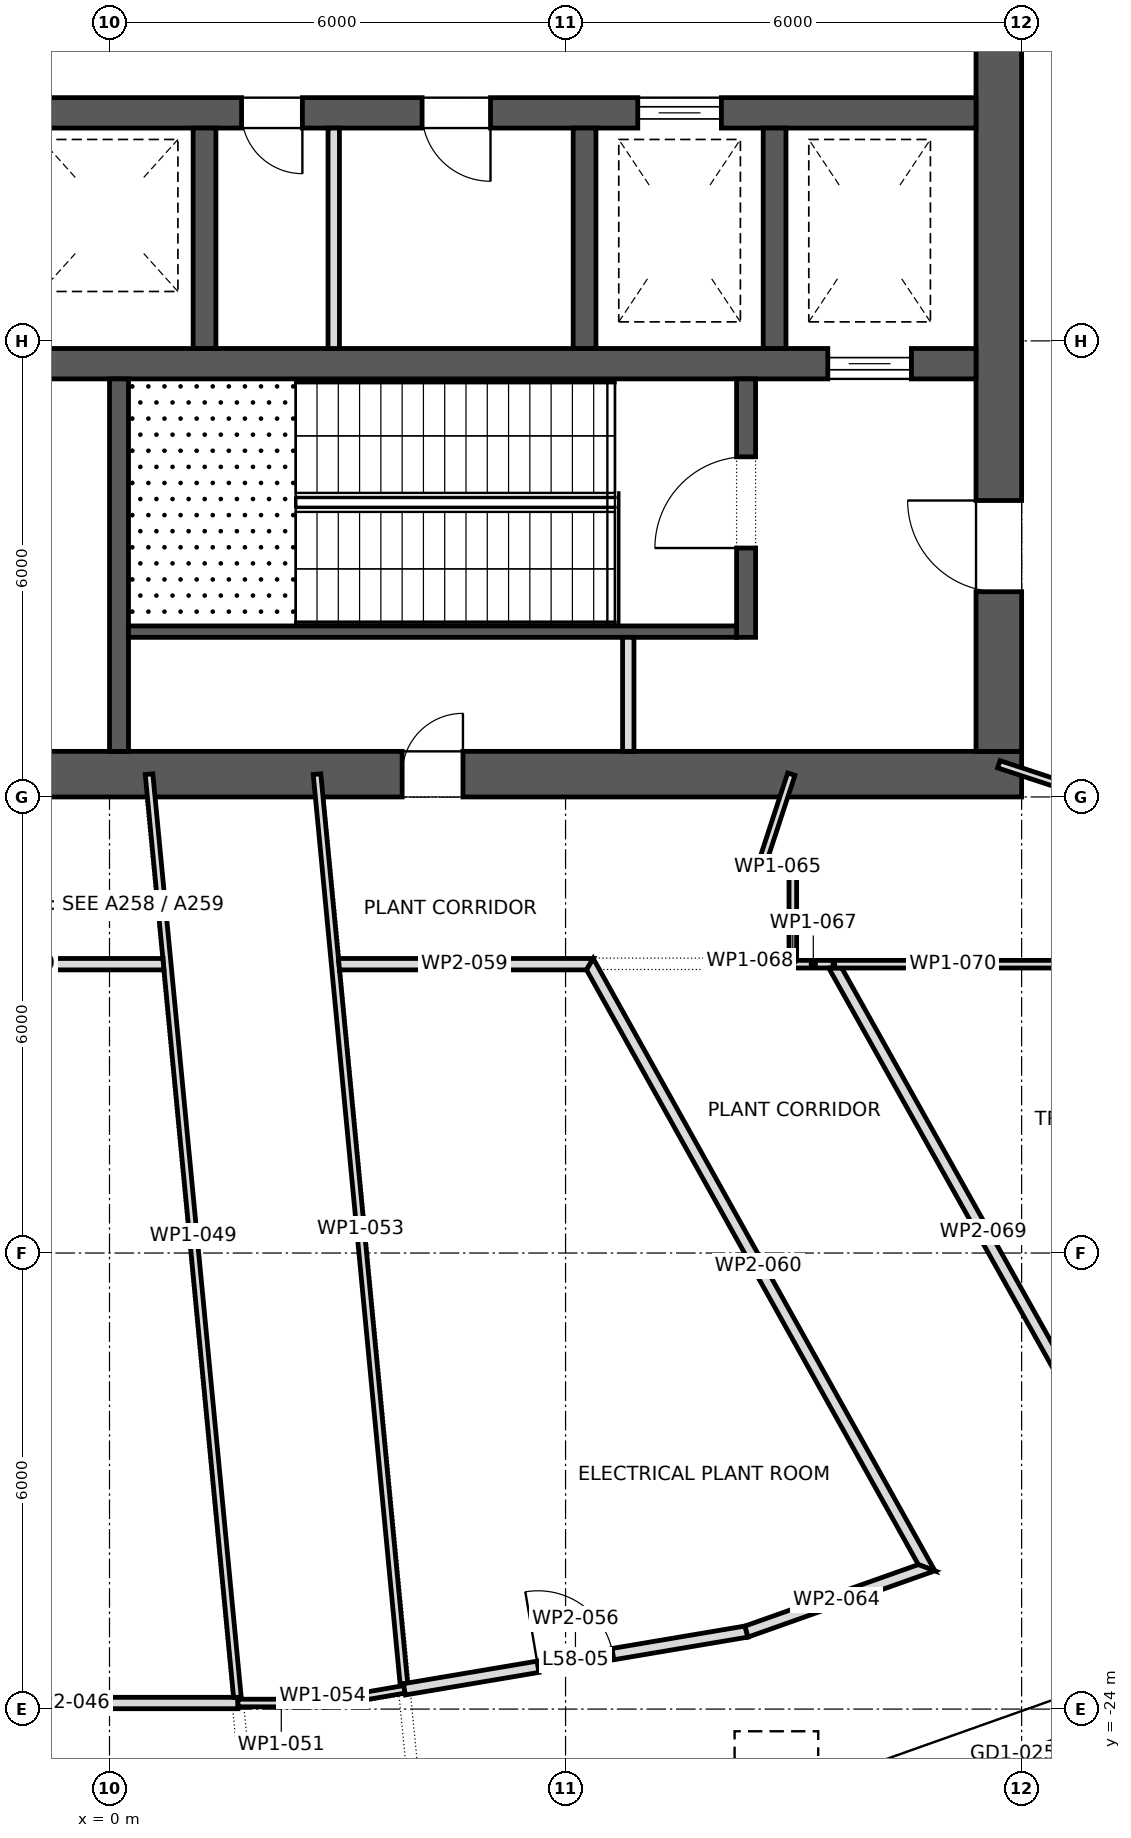
"""IFC4 building model, lengths in metres.
Left out: names, types, materials, properties, quantities, classifications, styles, units other than length and angle.
Written with IfcOpenShell. Run it as: python <this file> out.ifc"""

import sys

from ifc_helpers import new_model, si_unit, direction, frame, frame_2d, origin, origin_2d, place, context, subcontext, project, spatial, polyline, rectangle, outline, extrude, element, fill, save


model = new_model("IFC4")
c1 = context("Model", 3, precision=1e-05, world=origin(), true_north=direction((0.0, 1.0)))
c2 = subcontext(c1, "Body", "Model", "MODEL_VIEW")
j1 = project(units=[si_unit("LENGTHUNIT", "METRE"), si_unit("PLANEANGLEUNIT", "RADIAN")], contexts=[c1])
p1 = place(None, origin())
s1 = spatial("IfcSite", under=j1, at=p1, CompositionType="ELEMENT")
p2 = place(p1, origin())
s2 = spatial("IfcBuilding", under=s1, at=p2, CompositionType="ELEMENT")
p3 = place(p2, frame((0.0, 0.0, 250.9)))
s3 = spatial("IfcBuildingStorey", under=s2, at=p3, CompositionType="ELEMENT", Elevation=250.9)
p4 = place(p3, frame((9.056, -25.588, 0.079), z_axis=(-0.053067495482, 0.149959361151, 0.987266950184), x_axis=(-0.942712482292, -0.333606318481, 0.0)))
e1 = element("IfcColumn", 1, at=p4, inside=s3, PredefinedType="COLUMN", context=c2, shape_type="SweptSolid", body=[
    extrude(rectangle(XDim=1.1, YDim=1.0, at=origin_2d()), origin(), (0.0, 0.0, 1.0), 5.309),
])
p5 = place(p3, frame((-12.0, -11.7, 0.0), z_axis=(0.0, 0.0, 1.0), x_axis=(1.0, 0.0, 0.0)))
e2 = element("IfcWall", 2, at=p5, inside=s3, PredefinedType="SHEAR", context=c2, shape_type="SweptSolid", body=[
    extrude(rectangle(XDim=24.0, YDim=0.6, at=frame_2d((12.0, 0.0))), origin(), (0.0, 0.0, 1.0), 5.4),
])
p6 = place(p5, frame((10.025, 0.0, 0.0)))
e3 = element("IfcOpeningElement", 3, at=p6, cuts=e2, PredefinedType="OPENING", context=c2, shape_type="SweptSolid", body=[
    extrude(rectangle(XDim=0.8, YDim=2.1, at=frame_2d((0.4, 1.05))), frame((0.0, 0.312, 0.0), z_axis=(0.0, -1.0, 0.0), x_axis=(1.0, 0.0, 0.0)), (0.0, 0.0, 1.0), 0.624),
])
p7 = place(p5, frame((4.2, 0.0, 0.0)))
e4 = element("IfcOpeningElement", 4, at=p7, cuts=e2, PredefinedType="OPENING", context=c2, shape_type="SweptSolid", body=[
    extrude(rectangle(XDim=0.8, YDim=2.1, at=frame_2d((0.4, 1.05))), frame((0.0, 0.312, 0.0), z_axis=(0.0, -1.0, 0.0), x_axis=(1.0, 0.0, 0.0)), (0.0, 0.0, 1.0), 0.624),
])
p8 = place(p5, frame((15.85, 0.0, 0.0)))
e5 = element("IfcOpeningElement", 5, at=p8, cuts=e2, PredefinedType="OPENING", context=c2, shape_type="SweptSolid", body=[
    extrude(rectangle(XDim=0.8, YDim=2.1, at=frame_2d((0.4, 1.05))), frame((0.0, 0.312, 0.0), z_axis=(0.0, -1.0, 0.0), x_axis=(1.0, 0.0, 0.0)), (0.0, 0.0, 1.0), 0.624),
])
p9 = place(p3, frame((11.7, -11.4, 0.0), z_axis=(0.0, 0.0, 1.0), x_axis=(0.0, 1.0, 0.0)))
e6 = element("IfcWall", 6, at=p9, inside=s3, PredefinedType="SHEAR", context=c2, shape_type="SweptSolid", body=[
    extrude(rectangle(XDim=22.8, YDim=0.6, at=frame_2d((11.4, 0.0))), origin(), (0.0, 0.0, 1.0), 5.4),
])
p10 = place(p9, frame((10.2, 0.0, 0.0)))
e7 = element("IfcOpeningElement", 7, at=p10, cuts=e6, PredefinedType="OPENING", context=c2, shape_type="SweptSolid", body=[
    extrude(rectangle(XDim=2.4, YDim=2.1, at=frame_2d((1.2, 1.05))), frame((0.0, 0.312, 0.0), z_axis=(0.0, -1.0, 0.0), x_axis=(1.0, 0.0, 0.0)), (0.0, 0.0, 1.0), 0.624),
])
p11 = place(p9, frame((19.5, 0.0, 0.0)))
e8 = element("IfcOpeningElement", 8, at=p11, cuts=e6, PredefinedType="OPENING", context=c2, shape_type="SweptSolid", body=[
    extrude(rectangle(XDim=1.2, YDim=2.1, at=frame_2d((0.6, 1.05))), frame((0.0, 0.312, 0.0), z_axis=(0.0, -1.0, 0.0), x_axis=(1.0, 0.0, 0.0)), (0.0, 0.0, 1.0), 0.624),
])
p12 = place(p9, frame((2.1, 0.0, 0.0)))
e9 = element("IfcOpeningElement", 9, at=p12, cuts=e6, PredefinedType="OPENING", context=c2, shape_type="SweptSolid", body=[
    extrude(rectangle(XDim=1.2, YDim=2.1, at=frame_2d((0.6, 1.05))), frame((0.0, 0.312, 0.0), z_axis=(0.0, -1.0, 0.0), x_axis=(1.0, 0.0, 0.0)), (0.0, 0.0, 1.0), 0.624),
])
p13 = place(p3, frame((-11.4, -3.0, 0.0), z_axis=(0.0, 0.0, 1.0), x_axis=(1.0, 0.0, 0.0)))
e10 = element("IfcWall", 10, at=p13, inside=s3, PredefinedType="SHEAR", context=c2, shape_type="SweptSolid", body=[
    extrude(rectangle(XDim=22.8, YDim=0.4, at=frame_2d((11.4, 0.0))), origin(), (0.0, 0.0, 1.0), 5.4),
])
p14 = place(p13, frame((18.35, 0.0, 0.0)))
e11 = element("IfcOpeningElement", 11, at=p14, cuts=e10, PredefinedType="OPENING", context=c2, shape_type="SweptSolid", body=[
    extrude(rectangle(XDim=1.1, YDim=2.1, at=frame_2d((0.55, 1.05))), frame((0.0, 0.212, 0.0), z_axis=(0.0, -1.0, 0.0), x_axis=(1.0, 0.0, 0.0)), (0.0, 0.0, 1.0), 0.424),
])
p15 = place(p13, frame((13.137, 0.0, 0.0)))
e12 = element("IfcOpeningElement", 12, at=p15, cuts=e10, PredefinedType="OPENING", context=c2, shape_type="SweptSolid", body=[
    extrude(rectangle(XDim=0.8, YDim=2.1, at=frame_2d((0.4, 1.05))), frame((0.0, 0.212, 0.0), z_axis=(0.0, -1.0, 0.0), x_axis=(1.0, 0.0, 0.0)), (0.0, 0.0, 1.0), 0.424),
])
p16 = place(p13, frame((15.512, 0.0, 0.0)))
e13 = element("IfcOpeningElement", 13, at=p16, cuts=e10, PredefinedType="OPENING", context=c2, shape_type="SweptSolid", body=[
    extrude(rectangle(XDim=0.9, YDim=2.1, at=frame_2d((0.45, 1.05))), frame((0.0, 0.212, 0.0), z_axis=(0.0, -1.0, 0.0), x_axis=(1.0, 0.0, 0.0)), (0.0, 0.0, 1.0), 0.424),
])
p17 = place(p3, frame((-11.4, -6.3, 0.0), z_axis=(0.0, 0.0, 1.0), x_axis=(1.0, 0.0, 0.0)))
e14 = element("IfcWall", 14, at=p17, inside=s3, PredefinedType="SHEAR", context=c2, shape_type="SweptSolid", body=[
    extrude(rectangle(XDim=22.8, YDim=0.4, at=frame_2d((11.4, 0.0))), origin(), (0.0, 0.0, 1.0), 5.4),
])
p18 = place(p17, frame((20.85, 0.0, 0.0)))
e15 = element("IfcOpeningElement", 15, at=p18, cuts=e14, PredefinedType="OPENING", context=c2, shape_type="SweptSolid", body=[
    extrude(rectangle(XDim=1.1, YDim=2.1, at=frame_2d((0.55, 1.05))), frame((0.0, 0.212, 0.0), z_axis=(0.0, -1.0, 0.0), x_axis=(1.0, 0.0, 0.0)), (0.0, 0.0, 1.0), 0.424),
])
for number, where, z_axis, x_axis in (
    (16, (1.25, -6.1, 0.0), (0.0, 0.0, 1.0), (0.0, 1.0, 0.0)),
    (17, (6.25, -6.1, 0.0), (0.0, 0.0, 1.0), (0.0, 1.0, 0.0)),
    (18, (8.75, -6.1, 0.0), (0.0, 0.0, 1.0), (0.0, 1.0, 0.0)),
):
    element("IfcWall", number, at=place(p3, frame(where, z_axis=z_axis, x_axis=x_axis)), inside=s3, PredefinedType="SHEAR", context=c2, shape_type="SweptSolid", body=[
        extrude(rectangle(XDim=2.9, YDim=0.3, at=frame_2d((1.45, 0.0))), origin(), (0.0, 0.0, 1.0), 5.4),
    ])
p19 = place(p3, frame((0.125, -11.4, 0.0), z_axis=(0.0, 0.0, 1.0), x_axis=(0.0, 1.0, 0.0)))
e19 = element("IfcWall", 19, at=p19, inside=s3, PredefinedType="SHEAR", context=c2, shape_type="SweptSolid", body=[
    extrude(rectangle(XDim=4.9, YDim=0.25, at=frame_2d((2.45, 0.0))), origin(), (0.0, 0.0, 1.0), 5.1),
])
p20 = place(p3, frame((8.375, -9.9, 0.0), z_axis=(0.0, 0.0, 1.0), x_axis=(0.0, 1.0, 0.0)))
e20 = element("IfcWall", 20, at=p20, inside=s3, PredefinedType="SHEAR", context=c2, shape_type="SweptSolid", body=[
    extrude(rectangle(XDim=3.4, YDim=0.25, at=frame_2d((1.7, 0.0))), origin(), (0.0, 0.0, 1.0), 5.1),
])
p21 = place(p20, frame((1.175, 0.0, 0.0)))
e21 = element("IfcOpeningElement", 21, at=p21, cuts=e20, PredefinedType="OPENING", context=c2, shape_type="SweptSolid", body=[
    extrude(rectangle(XDim=1.2, YDim=2.1, at=frame_2d((0.6, 1.05))), frame((0.0, 0.137, 0.0), z_axis=(0.0, -1.0, 0.0), x_axis=(1.0, 0.0, 0.0)), (0.0, 0.0, 1.0), 0.274),
])
p22 = place(p3, frame((0.25, -9.825, 0.0), z_axis=(0.0, 0.0, 1.0), x_axis=(1.0, 0.0, 0.0)))
e22 = element("IfcWall", 22, at=p22, inside=s3, PredefinedType="SHEAR", context=c2, shape_type="SweptSolid", body=[
    extrude(rectangle(XDim=8.0, YDim=0.15, at=frame_2d((4.0, 0.0))), origin(), (0.0, 0.0, 1.0), 5.1),
])
p23 = place(p3, frame((6.825, -11.4, 0.0), z_axis=(0.0, 0.0, 1.0), x_axis=(0.0, 1.0, 0.0)))
e23 = element("IfcWall", 23, at=p23, inside=s3, PredefinedType="PARTITIONING", context=c2, shape_type="SweptSolid", body=[
    extrude(rectangle(XDim=1.5, YDim=0.15, at=frame_2d((0.75, 0.0))), origin(), (0.0, 0.0, 1.0), 5.1),
])
p24 = place(p3, frame((2.95, -6.1, 0.0), z_axis=(0.0, 0.0, 1.0), x_axis=(0.0, 1.0, 0.0)))
e24 = element("IfcWall", 24, at=p24, inside=s3, PredefinedType="PARTITIONING", context=c2, shape_type="SweptSolid", body=[
    extrude(rectangle(XDim=2.9, YDim=0.15, at=frame_2d((1.45, 0.0))), origin(), (0.0, 0.0, 1.0), 5.1),
])
p25 = place(p3, frame((-2.836, -23.92, 0.0), z_axis=(0.0, 0.0, 1.0), x_axis=(1.0, 0.0, 0.0)))
e25 = element("IfcWall", 25, at=p25, inside=s3, PredefinedType="PARTITIONING", context=c2, shape_type="SweptSolid", body=[
    extrude(outline(polyline([(4.526, 0.075), (3.021, 0.075), (1.517, 0.075), (0.012, 0.075), (0.0, -0.073), (0.0, -0.075), (1.509, -0.075), (3.017, -0.075), (4.526, -0.075), (4.526, 0.075)])), origin(), (0.0, 0.0, 1.0), 5.1),
])
p26 = place(p3, frame((0.52, -11.7, 0.0), z_axis=(0.0, 0.0, 1.0), x_axis=(0.095316823635, -0.995446986601, 0.0)))
e26 = element("IfcWall", 26, at=p26, inside=s3, PredefinedType="PARTITIONING", context=c2, shape_type="SweptSolid", body=[
    extrude(outline(polyline([(0.0, -0.05), (2.431, -0.05), (2.431, -0.05), (2.437, -0.05), (4.389, -0.05), (6.341, -0.05), (8.292, -0.05), (10.244, -0.05), (12.196, -0.05), (12.201, 0.007), (12.226, 0.005), (12.23, 0.05), (12.23, 0.05), (10.483, 0.05), (8.736, 0.05), (6.989, 0.05), (5.242, 0.05), (3.494, 0.05), (1.747, 0.05), (0.0, 0.05), (0.0, -0.05)])), origin(), (0.0, 0.0, 1.0), 5.1),
])
p27 = place(p3, frame((0.716, -14.2, 0.0), z_axis=(0.0, 0.0, 1.0), x_axis=(-1.0, 0.0, 0.0)))
e27 = element("IfcWall", 27, at=p27, inside=s3, PredefinedType="PARTITIONING", context=c2, shape_type="SweptSolid", body=[
    extrude(outline(polyline([(0.014, -0.075), (1.366, -0.075), (2.718, -0.075), (4.07, -0.075), (4.016, 0.0), (3.962, 0.075), (1.981, 0.075), (0.0, 0.075), (0.0, 0.072), (0.014, -0.075)])), origin(), (0.0, 0.0, 1.0), 5.1),
])
p28 = place(p3, frame((1.69, -23.92, 0.0), z_axis=(0.0, 0.0, 1.0), x_axis=(1.0, 0.0, 0.0)))
e28 = element("IfcWall", 28, at=p28, inside=s3, PredefinedType="PARTITIONING", context=c2, shape_type="SweptSolid", body=[
    extrude(outline(polyline([(1.144, -0.05), (1.144, -0.05), (1.136, 0.05), (0.0, 0.05), (0.0, -0.05), (1.144, -0.05)])), origin(), (0.0, 0.0, 1.0), 5.1),
])
p29 = place(p3, frame((2.73, -11.7, 0.0), z_axis=(0.0, 0.0, 1.0), x_axis=(0.095076842023, -0.995469936317, 0.0)))
e29 = element("IfcWall", 29, at=p29, inside=s3, PredefinedType="PARTITIONING", context=c2, shape_type="SweptSolid", body=[
    extrude(outline(polyline([(12.048, -0.05), (12.048, -0.049), (12.045, -0.004), (12.048, -0.003), (12.048, -0.003), (12.02, -0.005), (12.016, 0.05), (10.131, 0.05), (8.246, 0.05), (6.361, 0.05), (4.476, 0.05), (2.592, 0.05), (2.592, 0.049), (2.579, 0.05), (1.29, 0.05), (0.0, 0.05), (0.0, -0.05), (1.721, -0.05), (3.442, -0.05), (5.164, -0.05), (6.885, -0.05), (8.606, -0.05), (10.327, -0.05), (12.048, -0.05)])), origin(), (0.0, 0.0, 1.0), 5.1),
])
p30 = place(p3, frame((2.826, -23.921, 0.0), z_axis=(0.0, 0.0, 1.0), x_axis=(0.985630942271, 0.168913130449, 0.0)))
e30 = element("IfcWall", 30, at=p30, inside=s3, PredefinedType="PARTITIONING", context=c2, shape_type="SweptSolid", body=[
    extrude(outline(polyline([(1.07, 0.05), (0.009, 0.05), (0.0, -0.05), (1.07, -0.05), (1.07, 0.05)])), origin(), (0.0, 0.0, 1.0), 5.1),
])
p31 = place(p3, frame((3.88, -23.74, 0.0), z_axis=(0.0, 0.0, 1.0), x_axis=(0.986040852246, 0.166503566632, 0.0)))
e31 = element("IfcWall", 31, at=p31, inside=s3, PredefinedType="PARTITIONING", context=c2, shape_type="SweptSolid", body=[
    extrude(outline(polyline([(4.57, -0.075), (4.57, -0.074), (4.557, 0.075), (3.038, 0.075), (1.519, 0.075), (0.0, 0.075), (0.0, -0.075), (1.523, -0.075), (3.047, -0.075), (4.57, -0.075)])), origin(), (0.0, 0.0, 1.0), 5.1),
])
p32 = place(p31, frame((1.782, 0.0, 0.0)))
e32 = element("IfcOpeningElement", 32, at=p32, cuts=e31, PredefinedType="OPENING", context=c2, shape_type="SweptSolid", body=[
    extrude(rectangle(XDim=1.0, YDim=2.1, at=frame_2d((0.5, 1.05))), frame((0.0, 0.087, 0.0), z_axis=(0.0, -1.0, 0.0), x_axis=(1.0, 0.0, 0.0)), (0.0, 0.0, 1.0), 0.174),
])
p33 = place(p3, frame((6.364, -14.2, 0.0), z_axis=(0.0, 0.0, 1.0), x_axis=(-1.0, 0.0, 0.0)))
e33 = element("IfcWall", 33, at=p33, inside=s3, PredefinedType="PARTITIONING", context=c2, shape_type="SweptSolid", body=[
    extrude(outline(polyline([(3.352, -0.075), (3.352, -0.074), (3.338, 0.075), (1.713, 0.075), (0.088, 0.075), (0.044, 0.0), (0.0, -0.075), (1.676, -0.075), (3.352, -0.075)])), origin(), (0.0, 0.0, 1.0), 5.1),
])
p34 = place(p3, frame((6.299, -14.162, 0.0), z_axis=(0.0, 0.0, 1.0), x_axis=(0.487226307056, -0.873275744374, 0.0)))
e34 = element("IfcWall", 34, at=p34, inside=s3, PredefinedType="PARTITIONING", context=c2, shape_type="SweptSolid", body=[
    extrude(outline(polyline([(0.088, -0.075), (1.88, -0.075), (3.672, -0.075), (5.464, -0.075), (7.255, -0.075), (9.047, -0.075), (9.225, 0.075), (9.225, 0.075), (7.38, 0.075), (5.535, 0.075), (3.69, 0.075), (1.845, 0.075), (0.0, 0.075), (0.0, 0.075), (0.088, -0.075)])), origin(), (0.0, 0.0, 1.0), 5.1),
])
p35 = place(p3, frame((8.374, -22.982, 0.0), z_axis=(0.0, 0.0, 1.0), x_axis=(0.942556062192, 0.334048004971, 0.0)))
e35 = element("IfcWall", 35, at=p35, inside=s3, PredefinedType="PARTITIONING", context=c2, shape_type="SweptSolid", body=[
    extrude(outline(polyline([(0.0, -0.075), (1.305, -0.075), (2.61, -0.075), (2.432, 0.075), (0.013, 0.075), (0.0, -0.075)])), origin(), (0.0, 0.0, 1.0), 5.1),
])
p36 = place(p3, frame((8.542, -12.844, 0.0), z_axis=(0.0, 0.0, 1.0), x_axis=(0.951016373971, -0.30914051245, 0.0)))
e36 = element("IfcWall", 36, at=p36, inside=s3, PredefinedType="PARTITIONING", context=c2, shape_type="SweptSolid", body=[
    extrude(outline(polyline([(0.0, -0.05), (0.434, -0.05), (0.507, 0.05), (0.507, 0.05), (0.1, 0.05), (0.0, -0.05)])), origin(), (0.0, 0.0, 1.0), 5.1),
])
p37 = place(p3, frame((8.97, -11.7, 0.0), z_axis=(0.0, 0.0, 1.0), x_axis=(-0.311209419885, -0.950341358131, 0.0)))
e37 = element("IfcWall", 37, at=p37, inside=s3, PredefinedType="PARTITIONING", context=c2, shape_type="SweptSolid", body=[
    extrude(outline(polyline([(1.271, -0.05), (1.271, -0.05), (1.17, 0.05), (0.0, 0.05), (0.0, -0.05), (1.271, -0.05)])), origin(), (0.0, 0.0, 1.0), 5.1),
])
p38 = place(p3, frame((8.94, -14.2, 0.0), z_axis=(0.0, 0.0, 1.0), x_axis=(1.0, 0.0, 0.0)))
e38 = element("IfcWall", 38, at=p38, inside=s3, PredefinedType="PARTITIONING", context=c2, shape_type="SweptSolid", body=[
    extrude(outline(polyline([(0.0, -0.05), (0.59, -0.05), (0.59, 0.05), (0.59, 0.05), (0.59, 0.05), (0.1, 0.05), (0.0, -0.05)])), origin(), (0.0, 0.0, 1.0), 5.1),
])
p39 = place(p3, frame((8.99, -12.954, 0.0), z_axis=(0.0, 0.0, 1.0), x_axis=(0.0, -1.0, 0.0)))
e39 = element("IfcWall", 39, at=p39, inside=s3, PredefinedType="PARTITIONING", context=c2, shape_type="SweptSolid", body=[
    extrude(outline(polyline([(1.296, -0.05), (1.296, -0.05), (1.196, 0.05), (0.0, 0.05), (0.073, -0.05), (1.296, -0.05)])), origin(), (0.0, 0.0, 1.0), 5.1),
])
p40 = place(p3, frame((9.528, -14.213, 0.0), z_axis=(0.0, 0.0, 1.0), x_axis=(0.488729226687, -0.872435523682, 0.0)))
e40 = element("IfcWall", 40, at=p40, inside=s3, PredefinedType="PARTITIONING", context=c2, shape_type="SweptSolid", body=[
    extrude(outline(polyline([(0.0, -0.075), (1.618, -0.075), (3.237, -0.075), (4.855, -0.075), (6.473, -0.075), (8.092, -0.075), (8.028, -0.012), (7.94, 0.075), (5.976, 0.075), (4.012, 0.075), (2.048, 0.075), (0.084, 0.075), (0.033, -0.016), (0.0, -0.075), (0.0, -0.075)])), origin(), (0.0, 0.0, 1.0), 5.1),
])
p41 = place(p3, frame((9.53, -14.2, 0.0), z_axis=(0.0, 0.0, 1.0), x_axis=(1.0, 0.0, 0.0)))
e41 = element("IfcWall", 41, at=p41, inside=s3, PredefinedType="PARTITIONING", context=c2, shape_type="SweptSolid", body=[
    extrude(outline(polyline([(0.0, -0.05), (1.561, -0.05), (3.122, -0.05), (3.138, 0.05), (3.138, 0.05), (1.569, 0.05), (0.0, 0.05), (0.0, -0.05)])), origin(), (0.0, 0.0, 1.0), 5.1),
])
p42 = place(p3, frame((11.7, -11.57, 0.0), z_axis=(0.0, 0.0, 1.0), x_axis=(0.949849374499, -0.312707796135, 0.0)))
e42 = element("IfcWall", 42, at=p42, inside=s3, PredefinedType="PARTITIONING", context=c2, shape_type="SweptSolid", body=[
    extrude(rectangle(XDim=10.972, YDim=0.1, at=frame_2d((5.486, 0.0))), origin(), (0.0, 0.0, 1.0), 5.1),
])
p43 = place(p18, origin())
e43 = element("IfcDoor", 43, at=p43, inside=s3, OperationType="SLIDING_TO_LEFT", PredefinedType="DOOR", context=c2, shape_type="SweptSolid", body=[
    extrude(rectangle(XDim=1.1, YDim=2.1, at=frame_2d((0.55, 1.05))), frame((0.0, 0.025, 0.0), z_axis=(0.0, -1.0, 0.0), x_axis=(1.0, 0.0, 0.0)), (0.0, 0.0, 1.0), 0.05),
])
fill(e15, e43)
p44 = place(p14, origin())
e44 = element("IfcDoor", 44, at=p44, inside=s3, OperationType="SLIDING_TO_LEFT", PredefinedType="DOOR", context=c2, shape_type="SweptSolid", body=[
    extrude(rectangle(XDim=1.1, YDim=2.1, at=frame_2d((0.55, 1.05))), frame((0.0, 0.025, 0.0), z_axis=(0.0, -1.0, 0.0), x_axis=(1.0, 0.0, 0.0)), (0.0, 0.0, 1.0), 0.05),
])
fill(e11, e44)
p45 = place(p21, origin())
e45 = element("IfcDoor", 45, at=p45, inside=s3, OperationType="SINGLE_SWING_RIGHT", PredefinedType="DOOR", context=c2, shape_type="SweptSolid", body=[
    extrude(rectangle(XDim=1.2, YDim=2.1, at=frame_2d((0.6, 1.05))), frame((0.0, 0.025, 0.0), z_axis=(0.0, -1.0, 0.0), x_axis=(1.0, 0.0, 0.0)), (0.0, 0.0, 1.0), 0.05),
])
fill(e21, e45)
p46 = place(p12, origin())
e46 = element("IfcDoor", 46, at=p46, inside=s3, OperationType="SINGLE_SWING_LEFT", PredefinedType="DOOR", context=c2, shape_type="SweptSolid", body=[
    extrude(rectangle(XDim=1.2, YDim=2.1, at=frame_2d((0.6, 1.05))), frame((0.0, 0.025, 0.0), z_axis=(0.0, -1.0, 0.0), x_axis=(1.0, 0.0, 0.0)), (0.0, 0.0, 1.0), 0.05),
])
fill(e9, e46)
p47 = place(p8, origin())
e47 = element("IfcDoor", 47, at=p47, inside=s3, OperationType="SINGLE_SWING_LEFT", PredefinedType="DOOR", context=c2, shape_type="SweptSolid", body=[
    extrude(rectangle(XDim=0.8, YDim=2.1, at=frame_2d((0.4, 1.05))), frame((0.0, 0.025, 0.0), z_axis=(0.0, -1.0, 0.0), x_axis=(1.0, 0.0, 0.0)), (0.0, 0.0, 1.0), 0.05),
])
fill(e5, e47)
p48 = place(p15, frame((0.8, 0.0, 0.0), z_axis=(0.0, 0.0, 1.0), x_axis=(-1.0, 0.0, 0.0)))
e48 = element("IfcDoor", 48, at=p48, inside=s3, OperationType="SINGLE_SWING_RIGHT", PredefinedType="DOOR", context=c2, shape_type="SweptSolid", body=[
    extrude(rectangle(XDim=0.8, YDim=2.1, at=frame_2d((0.4, 1.05))), frame((0.0, 0.025, 0.0), z_axis=(0.0, -1.0, 0.0), x_axis=(1.0, 0.0, 0.0)), (0.0, 0.0, 1.0), 0.05),
])
fill(e12, e48)
p49 = place(p16, frame((0.9, 0.0, 0.0), z_axis=(0.0, 0.0, 1.0), x_axis=(-1.0, 0.0, 0.0)))
e49 = element("IfcDoor", 49, at=p49, inside=s3, OperationType="SINGLE_SWING_RIGHT", PredefinedType="DOOR", context=c2, shape_type="SweptSolid", body=[
    extrude(rectangle(XDim=0.9, YDim=2.1, at=frame_2d((0.45, 1.05))), frame((0.0, 0.025, 0.0), z_axis=(0.0, -1.0, 0.0), x_axis=(1.0, 0.0, 0.0)), (0.0, 0.0, 1.0), 0.05),
])
fill(e13, e49)
p50 = place(p32, origin())
e50 = element("IfcDoor", 50, at=p50, inside=s3, OperationType="SINGLE_SWING_RIGHT", PredefinedType="DOOR", context=c2, shape_type="SweptSolid", body=[
    extrude(rectangle(XDim=1.0, YDim=2.1, at=frame_2d((0.5, 1.05))), frame((0.0, 0.025, 0.0), z_axis=(0.0, -1.0, 0.0), x_axis=(1.0, 0.0, 0.0)), (0.0, 0.0, 1.0), 0.05),
])
fill(e32, e50)
save(model, sys.argv[1])
